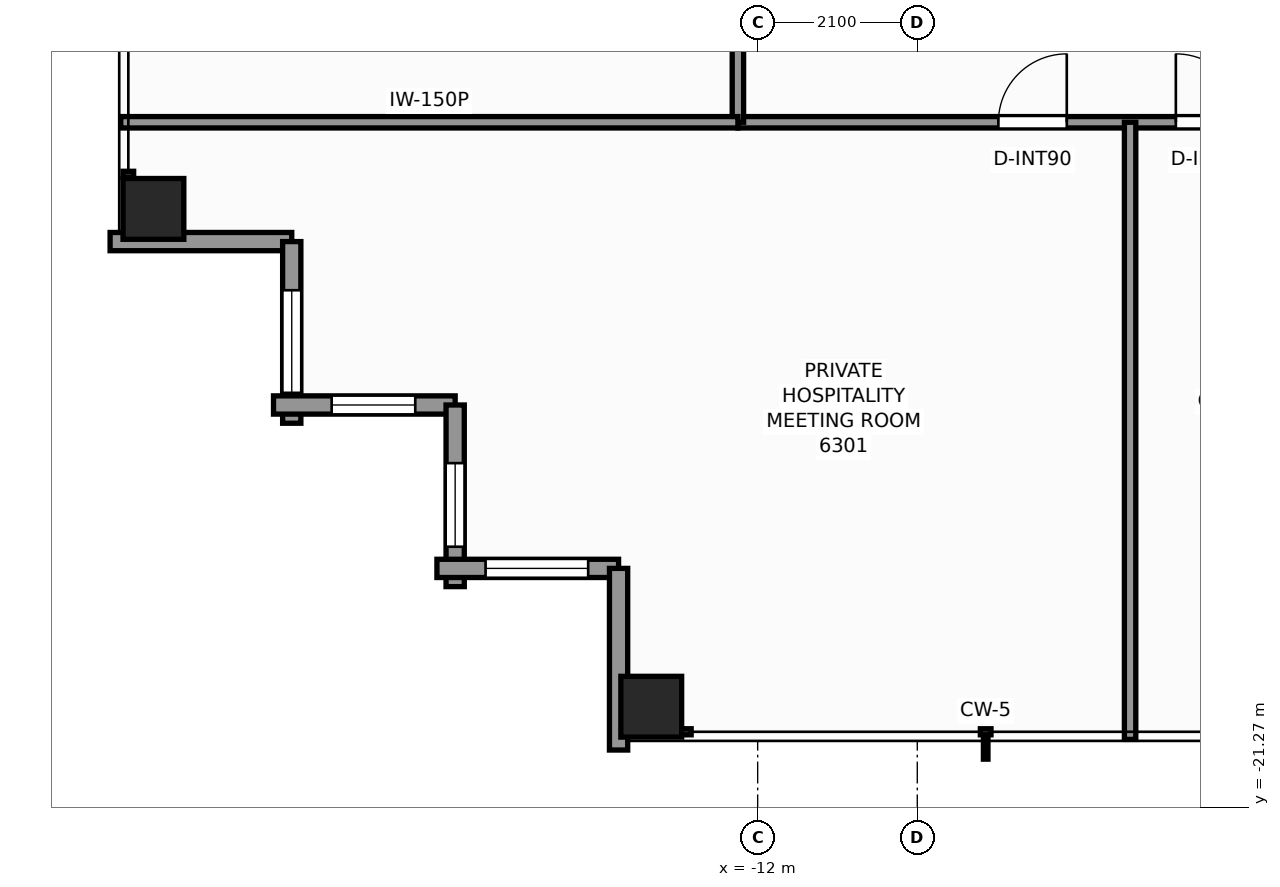
"""IFC4 building model, lengths in metres.
Left out: names, types, materials, properties, quantities, classifications, styles, units other than length and angle.
Written with IfcOpenShell. Run it as: python <this file> out.ifc"""

import sys

from ifc_helpers import new_model, si_unit, direction, frame, frame_2d, origin, origin_2d, place, context, subcontext, project, spatial, rectangle, extrude, element, fill, save


model = new_model("IFC4")
c1 = context("Model", 3, precision=1e-05, world=origin(), true_north=direction((0.0, 1.0)))
c2 = subcontext(c1, "Body", "Model", "MODEL_VIEW")
j1 = project(units=[si_unit("LENGTHUNIT", "METRE"), si_unit("PLANEANGLEUNIT", "RADIAN")], contexts=[c1])
p1 = place(None, origin())
s1 = spatial("IfcSite", under=j1, at=p1, CompositionType="ELEMENT")
p2 = place(p1, origin())
s2 = spatial("IfcBuilding", under=s1, at=p2, CompositionType="ELEMENT")
p3 = place(p2, frame((0.0, 0.0, 216.3)))
s3 = spatial("IfcBuildingStorey", under=s2, at=p3, CompositionType="ELEMENT", Elevation=216.3)
for number, where, z_axis, x_axis in (
    (1, (-13.4, -19.95, 0.0), (0.0, 0.0, 1.0), (1.0, 0.0, 0.0)),
    (2, (-19.95, -13.4, 0.0), (0.0, 0.0, 1.0), (1.0, 0.0, 0.0)),
):
    element("IfcColumn", number, at=place(p3, frame(where, z_axis=z_axis, x_axis=x_axis)), inside=s3, PredefinedType="COLUMN", context=c2, shape_type="SweptSolid", body=[
        extrude(rectangle(XDim=0.8, YDim=0.8, at=origin_2d()), origin(), (0.0, 0.0, 1.0), 3.3),
    ])
p4 = place(p3, frame((-18.13, -13.83, 0.0), z_axis=(0.0, 0.0, 1.0), x_axis=(-1.0, 0.0, 0.0)))
e3 = element("IfcWall", 3, at=p4, inside=s3, PredefinedType="STANDARD", context=c2, shape_type="SweptSolid", body=[
    extrude(rectangle(XDim=2.39, YDim=0.24, at=frame_2d((1.195, 0.0))), origin(), (0.0, 0.0, 1.0), 2.463),
])
p5 = place(p3, frame((-18.13, -16.22, 0.0), z_axis=(0.0, 0.0, 1.0), x_axis=(0.0, 1.0, 0.0)))
e4 = element("IfcWall", 4, at=p5, inside=s3, PredefinedType="STANDARD", context=c2, shape_type="SweptSolid", body=[
    extrude(rectangle(XDim=2.39, YDim=0.24, at=frame_2d((1.195, 0.0))), origin(), (0.0, 0.0, 1.0), 2.463),
])
p6 = place(p5, frame((0.4, 0.0, 0.65)))
e5 = element("IfcOpeningElement", 5, at=p6, cuts=e4, PredefinedType="OPENING", context=c2, shape_type="SweptSolid", body=[
    extrude(rectangle(XDim=1.35, YDim=1.55, at=frame_2d((0.675, 0.775))), frame((0.0, 0.13, 0.0), z_axis=(0.0, -1.0, 0.0), x_axis=(1.0, 0.0, 0.0)), (0.0, 0.0, 1.0), 0.26),
])
p7 = place(p3, frame((-15.98, -15.98, 0.0), z_axis=(0.0, 0.0, 1.0), x_axis=(-1.0, 0.0, 0.0)))
e6 = element("IfcWall", 6, at=p7, inside=s3, PredefinedType="STANDARD", context=c2, shape_type="SweptSolid", body=[
    extrude(rectangle(XDim=2.39, YDim=0.24, at=frame_2d((1.195, 0.0))), origin(), (0.0, 0.0, 1.0), 2.463),
])
p8 = place(p7, frame((0.525, 0.0, 0.65)))
e7 = element("IfcOpeningElement", 7, at=p8, cuts=e6, PredefinedType="OPENING", context=c2, shape_type="SweptSolid", body=[
    extrude(rectangle(XDim=1.1, YDim=1.45, at=frame_2d((0.55, 0.725))), frame((0.0, 0.13, 0.0), z_axis=(0.0, -1.0, 0.0), x_axis=(1.0, 0.0, 0.0)), (0.0, 0.0, 1.0), 0.26),
])
p9 = place(p3, frame((-15.98, -18.37, 0.0), z_axis=(0.0, 0.0, 1.0), x_axis=(0.0, 1.0, 0.0)))
e8 = element("IfcWall", 8, at=p9, inside=s3, PredefinedType="STANDARD", context=c2, shape_type="SweptSolid", body=[
    extrude(rectangle(XDim=2.39, YDim=0.24, at=frame_2d((1.195, 0.0))), origin(), (0.0, 0.0, 1.0), 2.463),
])
p10 = place(p9, frame((0.525, 0.0, 0.65)))
e9 = element("IfcOpeningElement", 9, at=p10, cuts=e8, PredefinedType="OPENING", context=c2, shape_type="SweptSolid", body=[
    extrude(rectangle(XDim=1.1, YDim=1.45, at=frame_2d((0.55, 0.725))), frame((0.0, 0.13, 0.0), z_axis=(0.0, -1.0, 0.0), x_axis=(1.0, 0.0, 0.0)), (0.0, 0.0, 1.0), 0.26),
])
p11 = place(p3, frame((-13.83, -18.13, 0.0), z_axis=(0.0, 0.0, 1.0), x_axis=(-1.0, 0.0, 0.0)))
e10 = element("IfcWall", 10, at=p11, inside=s3, PredefinedType="STANDARD", context=c2, shape_type="SweptSolid", body=[
    extrude(rectangle(XDim=2.39, YDim=0.24, at=frame_2d((1.195, 0.0))), origin(), (0.0, 0.0, 1.0), 2.463),
])
p12 = place(p11, frame((0.4, 0.0, 0.65)))
e11 = element("IfcOpeningElement", 11, at=p12, cuts=e10, PredefinedType="OPENING", context=c2, shape_type="SweptSolid", body=[
    extrude(rectangle(XDim=1.35, YDim=1.55, at=frame_2d((0.675, 0.775))), frame((0.0, 0.13, 0.0), z_axis=(0.0, -1.0, 0.0), x_axis=(1.0, 0.0, 0.0)), (0.0, 0.0, 1.0), 0.26),
])
p13 = place(p3, frame((-13.83, -20.52, 0.0), z_axis=(0.0, 0.0, 1.0), x_axis=(0.0, 1.0, 0.0)))
e12 = element("IfcWall", 12, at=p13, inside=s3, PredefinedType="STANDARD", context=c2, shape_type="SweptSolid", body=[
    extrude(rectangle(XDim=2.39, YDim=0.24, at=frame_2d((1.195, 0.0))), origin(), (0.0, 0.0, 1.0), 2.463),
])
p14 = place(p3, frame((-12.26, -12.26, 0.0), z_axis=(0.0, 0.0, 1.0), x_axis=(1.0, 0.0, 0.0)))
e13 = element("IfcWall", 13, at=p14, inside=s3, PredefinedType="PARTITIONING", context=c2, shape_type="SweptSolid", body=[
    extrude(rectangle(XDim=24.52, YDim=0.15, at=frame_2d((12.26, 0.0))), origin(), (0.0, 0.0, 1.0), 2.369),
])
p15 = place(p14, frame((3.427, 0.0, 0.0)))
e14 = element("IfcOpeningElement", 14, at=p15, cuts=e13, PredefinedType="OPENING", context=c2, shape_type="SweptSolid", body=[
    extrude(rectangle(XDim=0.9, YDim=2.06, at=frame_2d((0.45, 1.03))), frame((0.0, 0.085, 0.0), z_axis=(0.0, -1.0, 0.0), x_axis=(1.0, 0.0, 0.0)), (0.0, 0.0, 1.0), 0.17),
])
p16 = place(p14, frame((5.762, 0.0, 0.0)))
e15 = element("IfcOpeningElement", 15, at=p16, cuts=e13, PredefinedType="OPENING", context=c2, shape_type="SweptSolid", body=[
    extrude(rectangle(XDim=0.9, YDim=2.06, at=frame_2d((0.45, 1.03))), frame((0.0, 0.085, 0.0), z_axis=(0.0, -1.0, 0.0), x_axis=(1.0, 0.0, 0.0)), (0.0, 0.0, 1.0), 0.17),
])
p17 = place(p14, frame((9.473, 0.0, 0.0)))
e16 = element("IfcOpeningElement", 16, at=p17, cuts=e13, PredefinedType="OPENING", context=c2, shape_type="SweptSolid", body=[
    extrude(rectangle(XDim=0.9, YDim=2.06, at=frame_2d((0.45, 1.03))), frame((0.0, 0.085, 0.0), z_axis=(0.0, -1.0, 0.0), x_axis=(1.0, 0.0, 0.0)), (0.0, 0.0, 1.0), 0.17),
])
p18 = place(p14, frame((12.875, 0.0, 0.0)))
e17 = element("IfcOpeningElement", 17, at=p18, cuts=e13, PredefinedType="OPENING", context=c2, shape_type="SweptSolid", body=[
    extrude(rectangle(XDim=0.95, YDim=2.06, at=frame_2d((0.475, 1.03))), frame((0.0, 0.085, 0.0), z_axis=(0.0, -1.0, 0.0), x_axis=(1.0, 0.0, 0.0)), (0.0, 0.0, 1.0), 0.17),
])
p19 = place(p14, frame((18.625, 0.0, 0.0)))
e18 = element("IfcOpeningElement", 18, at=p19, cuts=e13, PredefinedType="OPENING", context=c2, shape_type="SweptSolid", body=[
    extrude(rectangle(XDim=0.9, YDim=2.06, at=frame_2d((0.45, 1.03))), frame((0.0, 0.085, 0.0), z_axis=(0.0, -1.0, 0.0), x_axis=(1.0, 0.0, 0.0)), (0.0, 0.0, 1.0), 0.17),
])
p20 = place(p14, frame((20.959, 0.0, 0.0)))
e19 = element("IfcOpeningElement", 19, at=p20, cuts=e13, PredefinedType="OPENING", context=c2, shape_type="SweptSolid", body=[
    extrude(rectangle(XDim=0.9, YDim=2.06, at=frame_2d((0.45, 1.03))), frame((0.0, 0.085, 0.0), z_axis=(0.0, -1.0, 0.0), x_axis=(1.0, 0.0, 0.0)), (0.0, 0.0, 1.0), 0.17),
])
p21 = place(p3, frame((-12.26, -12.26, 0.0), z_axis=(0.0, 0.0, 1.0), x_axis=(0.0, 1.0, 0.0)))
e20 = element("IfcWall", 20, at=p21, inside=s3, PredefinedType="PARTITIONING", context=c2, shape_type="SweptSolid", body=[
    extrude(rectangle(XDim=24.84, YDim=0.15, at=frame_2d((12.42, 0.0))), origin(), (0.0, 0.0, 1.0), 2.369),
])
p22 = place(p21, frame((2.944, 0.0, 0.0)))
e21 = element("IfcOpeningElement", 21, at=p22, cuts=e20, PredefinedType="OPENING", context=c2, shape_type="SweptSolid", body=[
    extrude(rectangle(XDim=0.9, YDim=2.06, at=frame_2d((0.45, 1.03))), frame((0.0, 0.085, 0.0), z_axis=(0.0, -1.0, 0.0), x_axis=(1.0, 0.0, 0.0)), (0.0, 0.0, 1.0), 0.17),
])
p23 = place(p21, frame((4.832, 0.0, 0.0)))
e22 = element("IfcOpeningElement", 22, at=p23, cuts=e20, PredefinedType="OPENING", context=c2, shape_type="SweptSolid", body=[
    extrude(rectangle(XDim=0.95, YDim=2.06, at=frame_2d((0.475, 1.03))), frame((0.0, 0.085, 0.0), z_axis=(0.0, -1.0, 0.0), x_axis=(1.0, 0.0, 0.0)), (0.0, 0.0, 1.0), 0.17),
])
p24 = place(p21, frame((14.418, 0.0, 0.0)))
e23 = element("IfcOpeningElement", 23, at=p24, cuts=e20, PredefinedType="OPENING", context=c2, shape_type="SweptSolid", body=[
    extrude(rectangle(XDim=0.95, YDim=2.06, at=frame_2d((0.475, 1.03))), frame((0.0, 0.085, 0.0), z_axis=(0.0, -1.0, 0.0), x_axis=(1.0, 0.0, 0.0)), (0.0, 0.0, 1.0), 0.17),
])
p25 = place(p21, frame((20.492, 0.0, 0.0)))
e24 = element("IfcOpeningElement", 24, at=p25, cuts=e20, PredefinedType="OPENING", context=c2, shape_type="SweptSolid", body=[
    extrude(rectangle(XDim=0.95, YDim=2.06, at=frame_2d((0.475, 1.03))), frame((0.0, 0.085, 0.0), z_axis=(0.0, -1.0, 0.0), x_axis=(1.0, 0.0, 0.0)), (0.0, 0.0, 1.0), 0.17),
])
p26 = place(p3, frame((-20.38, -12.26, 0.0), z_axis=(0.0, 0.0, 1.0), x_axis=(1.0, 0.0, 0.0)))
e25 = element("IfcWall", 25, at=p26, inside=s3, PredefinedType="PARTITIONING", context=c2, shape_type="SweptSolid", body=[
    extrude(rectangle(XDim=8.12, YDim=0.15, at=frame_2d((4.06, 0.0))), origin(), (0.0, 0.0, 1.0), 2.369),
])
p27 = place(p3, frame((-7.1, -20.38, 0.0), z_axis=(0.0, 0.0, 1.0), x_axis=(0.0, 1.0, 0.0)))
e26 = element("IfcWall", 26, at=p27, inside=s3, PredefinedType="PARTITIONING", context=c2, shape_type="SweptSolid", body=[
    extrude(rectangle(XDim=8.12, YDim=0.15, at=frame_2d((4.06, 0.0))), origin(), (0.0, 0.0, 1.0), 2.453),
])
p28 = place(p6, origin())
e27 = element("IfcWindow", 27, at=p28, inside=s3, PartitioningType="SINGLE_PANEL", PredefinedType="WINDOW", context=c2, shape_type="SweptSolid", body=[
    extrude(rectangle(XDim=1.35, YDim=1.55, at=frame_2d((0.675, 0.775))), frame((0.0, 0.03, 0.0), z_axis=(0.0, -1.0, 0.0), x_axis=(1.0, 0.0, 0.0)), (0.0, 0.0, 1.0), 0.06),
])
fill(e5, e27)
p29 = place(p8, origin())
e28 = element("IfcWindow", 28, at=p29, inside=s3, PartitioningType="SINGLE_PANEL", PredefinedType="WINDOW", context=c2, shape_type="SweptSolid", body=[
    extrude(rectangle(XDim=1.1, YDim=1.45, at=frame_2d((0.55, 0.725))), frame((0.0, 0.03, 0.0), z_axis=(0.0, -1.0, 0.0), x_axis=(1.0, 0.0, 0.0)), (0.0, 0.0, 1.0), 0.06),
])
fill(e7, e28)
p30 = place(p10, origin())
e29 = element("IfcWindow", 29, at=p30, inside=s3, PartitioningType="SINGLE_PANEL", PredefinedType="WINDOW", context=c2, shape_type="SweptSolid", body=[
    extrude(rectangle(XDim=1.1, YDim=1.45, at=frame_2d((0.55, 0.725))), frame((0.0, 0.03, 0.0), z_axis=(0.0, -1.0, 0.0), x_axis=(1.0, 0.0, 0.0)), (0.0, 0.0, 1.0), 0.06),
])
fill(e9, e29)
p31 = place(p12, origin())
e30 = element("IfcWindow", 30, at=p31, inside=s3, PartitioningType="SINGLE_PANEL", PredefinedType="WINDOW", context=c2, shape_type="SweptSolid", body=[
    extrude(rectangle(XDim=1.35, YDim=1.55, at=frame_2d((0.675, 0.775))), frame((0.0, 0.03, 0.0), z_axis=(0.0, -1.0, 0.0), x_axis=(1.0, 0.0, 0.0)), (0.0, 0.0, 1.0), 0.06),
])
fill(e11, e30)
p32 = place(p15, origin())
e31 = element("IfcDoor", 31, at=p32, inside=s3, OperationType="SINGLE_SWING_RIGHT", PredefinedType="DOOR", context=c2, shape_type="SweptSolid", body=[
    extrude(rectangle(XDim=0.9, YDim=2.06, at=frame_2d((0.45, 1.03))), frame((0.0, 0.025, 0.0), z_axis=(0.0, -1.0, 0.0), x_axis=(1.0, 0.0, 0.0)), (0.0, 0.0, 1.0), 0.05),
])
fill(e14, e31)
p33 = place(p16, origin())
e32 = element("IfcDoor", 32, at=p33, inside=s3, OperationType="SINGLE_SWING_LEFT", PredefinedType="DOOR", context=c2, shape_type="SweptSolid", body=[
    extrude(rectangle(XDim=0.9, YDim=2.06, at=frame_2d((0.45, 1.03))), frame((0.0, 0.025, 0.0), z_axis=(0.0, -1.0, 0.0), x_axis=(1.0, 0.0, 0.0)), (0.0, 0.0, 1.0), 0.05),
])
fill(e15, e32)
save(model, sys.argv[1])
